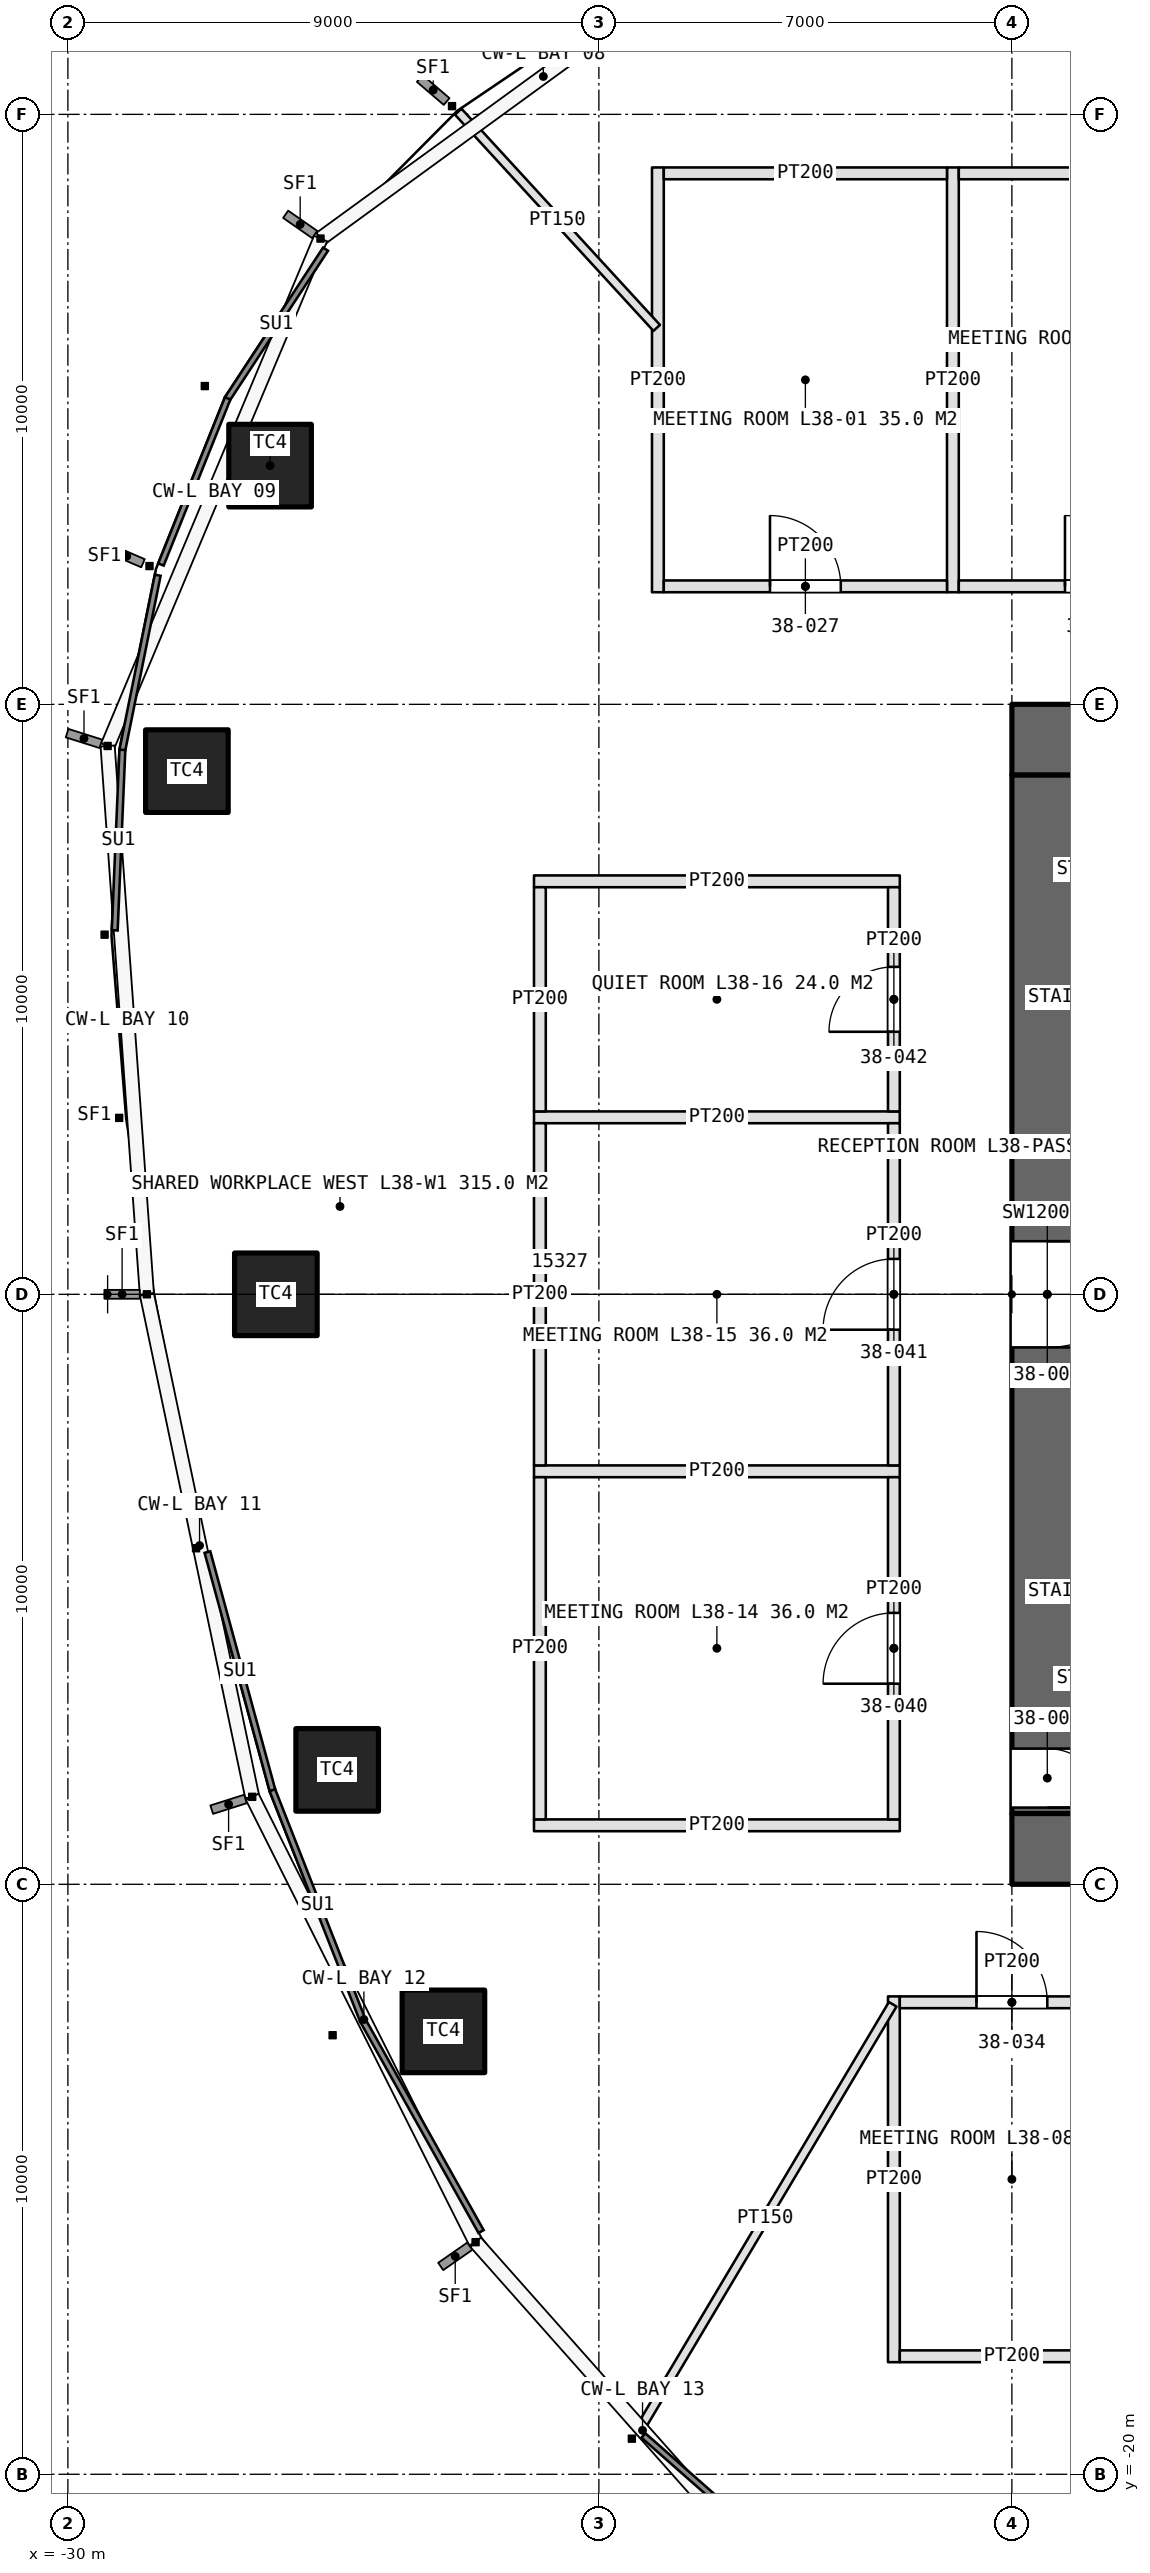
"""IFC4 building model, lengths in metres.
Left out: names, types, materials, properties, quantities, classifications, styles, units other than length and angle.
Written with IfcOpenShell. Run it as: python <this file> out.ifc"""

import sys

from ifc_helpers import new_model, si_unit, direction, frame, frame_2d, origin, origin_2d, place, context, subcontext, project, spatial, rectangle, extrude, element, fill, save


model = new_model("IFC4")
c1 = context("Model", 3, precision=1e-05, world=origin(), true_north=direction((0.0, 1.0)))
c2 = subcontext(c1, "Body", "Model", "MODEL_VIEW")
j1 = project(units=[si_unit("LENGTHUNIT", "METRE"), si_unit("PLANEANGLEUNIT", "RADIAN")], contexts=[c1])
p1 = place(None, origin())
s1 = spatial("IfcSite", under=j1, at=p1, CompositionType="ELEMENT")
p2 = place(p1, origin())
s2 = spatial("IfcBuilding", under=s1, at=p2, CompositionType="ELEMENT")
p3 = place(p2, frame((0.0, 0.0, 176.4)))
s3 = spatial("IfcBuildingStorey", under=s2, at=p3, CompositionType="ELEMENT", Elevation=176.4)
p4 = place(p3, frame((-14.0, -9.4, 0.0), z_axis=(0.0, 0.0, 1.0), x_axis=(1.0, 0.0, 0.0)))
e1 = element("IfcWall", 1, at=p4, inside=s3, PredefinedType="SHEAR", context=c2, shape_type="SweptSolid", body=[
    extrude(rectangle(XDim=28.0, YDim=1.2, at=frame_2d((14.0, 0.0))), origin(), (0.0, 0.0, 1.0), 4.2),
])
p5 = place(p4, frame((13.1, 0.0, 0.0)))
e2 = element("IfcOpeningElement", 2, at=p5, cuts=e1, PredefinedType="OPENING", context=c2, shape_type="SweptSolid", body=[
    extrude(rectangle(XDim=1.8, YDim=2.4, at=frame_2d((0.9, 1.2))), frame((0.0, 0.61, 0.0), z_axis=(0.0, -1.0, 0.0), x_axis=(1.0, 0.0, 0.0)), (0.0, 0.0, 1.0), 1.22),
])
p6 = place(p4, frame((22.9, 0.0, 0.0)))
e3 = element("IfcOpeningElement", 3, at=p6, cuts=e1, PredefinedType="OPENING", context=c2, shape_type="SweptSolid", body=[
    extrude(rectangle(XDim=2.2, YDim=2.7, at=frame_2d((1.1, 1.35))), frame((0.0, 0.61, 0.0), z_axis=(0.0, -1.0, 0.0), x_axis=(1.0, 0.0, 0.0)), (0.0, 0.0, 1.0), 1.22),
])
p7 = place(p3, frame((14.0, 9.4, 0.0), z_axis=(0.0, 0.0, 1.0), x_axis=(-1.0, 0.0, 0.0)))
e4 = element("IfcWall", 4, at=p7, inside=s3, PredefinedType="SHEAR", context=c2, shape_type="SweptSolid", body=[
    extrude(rectangle(XDim=28.0, YDim=1.2, at=frame_2d((14.0, 0.0))), origin(), (0.0, 0.0, 1.0), 4.2),
])
p8 = place(p7, frame((24.0, 0.0, 0.0)))
e5 = element("IfcOpeningElement", 5, at=p8, cuts=e4, PredefinedType="OPENING", context=c2, shape_type="SweptSolid", body=[
    extrude(rectangle(XDim=1.0, YDim=2.4, at=frame_2d((0.5, 1.2))), frame((0.0, 0.61, 0.0), z_axis=(0.0, -1.0, 0.0), x_axis=(1.0, 0.0, 0.0)), (0.0, 0.0, 1.0), 1.22),
])
p9 = place(p7, frame((13.1, 0.0, 0.0)))
e6 = element("IfcOpeningElement", 6, at=p9, cuts=e4, PredefinedType="OPENING", context=c2, shape_type="SweptSolid", body=[
    extrude(rectangle(XDim=1.8, YDim=2.4, at=frame_2d((0.9, 1.2))), frame((0.0, 0.61, 0.0), z_axis=(0.0, -1.0, 0.0), x_axis=(1.0, 0.0, 0.0)), (0.0, 0.0, 1.0), 1.22),
])
p10 = place(p3, frame((-13.4, 8.8, 0.0), z_axis=(0.0, 0.0, 1.0), x_axis=(0.0, -1.0, 0.0)))
e7 = element("IfcWall", 7, at=p10, inside=s3, PredefinedType="SHEAR", context=c2, shape_type="SweptSolid", body=[
    extrude(rectangle(XDim=17.6, YDim=1.2, at=frame_2d((8.8, 0.0))), origin(), (0.0, 0.0, 1.0), 4.2),
])
p11 = place(p10, frame((7.9, 0.0, 0.0)))
e8 = element("IfcOpeningElement", 8, at=p11, cuts=e7, PredefinedType="OPENING", context=c2, shape_type="SweptSolid", body=[
    extrude(rectangle(XDim=1.8, YDim=2.4, at=frame_2d((0.9, 1.2))), frame((0.0, 0.61, 0.0), z_axis=(0.0, -1.0, 0.0), x_axis=(1.0, 0.0, 0.0)), (0.0, 0.0, 1.0), 1.22),
])
p12 = place(p10, frame((16.5, 0.0, 0.0)))
e9 = element("IfcOpeningElement", 9, at=p12, cuts=e7, PredefinedType="OPENING", context=c2, shape_type="SweptSolid", body=[
    extrude(rectangle(XDim=1.0, YDim=2.4, at=frame_2d((0.5, 1.2))), frame((0.0, 0.61, 0.0), z_axis=(0.0, -1.0, 0.0), x_axis=(1.0, 0.0, 0.0)), (0.0, 0.0, 1.0), 1.22),
])
for number, where, z_axis, x_axis in (
    (10, (-26.573, 14.046, 0.0), (0.0, 0.0, 1.0), (1.0, 0.0, 0.0)),
    (11, (-27.983, 8.868, 0.0), (0.0, 0.0, 1.0), (1.0, 0.0, 0.0)),
    (12, (-26.475, 0.0, 0.0), (0.0, 0.0, 1.0), (1.0, 0.0, 0.0)),
    (13, (-25.436, -8.061, 0.0), (0.0, 0.0, 1.0), (1.0, 0.0, 0.0)),
    (14, (-23.635, -12.493, 0.0), (0.0, 0.0, 1.0), (1.0, 0.0, 0.0)),
):
    element("IfcColumn", number, at=place(p3, frame(where, z_axis=z_axis, x_axis=x_axis)), inside=s3, PredefinedType="COLUMN", context=c2, shape_type="SweptSolid", body=[
        extrude(rectangle(XDim=1.4, YDim=1.4, at=origin_2d()), origin(), (0.0, 0.0, 1.0), 4.2),
    ])
for number, where, z_axis, x_axis in (
    (15, (-20.0, 11.9, 0.0), (0.0, 0.0, 1.0), (0.0, 1.0, 0.0)),
    (16, (-15.0, 11.9, 0.0), (0.0, 0.0, 1.0), (0.0, 1.0, 0.0)),
):
    element("IfcWall", number, at=place(p3, frame(where, z_axis=z_axis, x_axis=x_axis)), inside=s3, PredefinedType="PARTITIONING", context=c2, shape_type="SweptSolid", body=[
        extrude(rectangle(XDim=7.2, YDim=0.2, at=frame_2d((3.6, 0.0))), origin(), (0.0, 0.0, 1.0), 3.0),
    ])
p13 = place(p3, frame((-19.9, 12.0, 0.0), z_axis=(0.0, 0.0, 1.0), x_axis=(1.0, 0.0, 0.0)))
e17 = element("IfcWall", 17, at=p13, inside=s3, PredefinedType="PARTITIONING", context=c2, shape_type="SweptSolid", body=[
    extrude(rectangle(XDim=4.8, YDim=0.2, at=frame_2d((2.4, 0.0))), origin(), (0.0, 0.0, 1.0), 3.0),
])
p14 = place(p13, frame((1.8, 0.0, 0.0)))
e18 = element("IfcOpeningElement", 18, at=p14, cuts=e17, PredefinedType="OPENING", context=c2, shape_type="SweptSolid", body=[
    extrude(rectangle(XDim=1.2, YDim=2.4, at=frame_2d((0.6, 1.2))), frame((0.0, 0.11, 0.0), z_axis=(0.0, -1.0, 0.0), x_axis=(1.0, 0.0, 0.0)), (0.0, 0.0, 1.0), 0.22),
])
p15 = place(p3, frame((-19.9, 19.0, 0.0), z_axis=(0.0, 0.0, 1.0), x_axis=(1.0, 0.0, 0.0)))
e19 = element("IfcWall", 19, at=p15, inside=s3, PredefinedType="PARTITIONING", context=c2, shape_type="SweptSolid", body=[
    extrude(rectangle(XDim=4.8, YDim=0.2, at=frame_2d((2.4, 0.0))), origin(), (0.0, 0.0, 1.0), 3.0),
])
p16 = place(p3, frame((-14.9, 12.0, 0.0), z_axis=(0.0, 0.0, 1.0), x_axis=(1.0, 0.0, 0.0)))
e20 = element("IfcWall", 20, at=p16, inside=s3, PredefinedType="PARTITIONING", context=c2, shape_type="SweptSolid", body=[
    extrude(rectangle(XDim=4.8, YDim=0.2, at=frame_2d((2.4, 0.0))), origin(), (0.0, 0.0, 1.0), 3.0),
])
p17 = place(p16, frame((1.8, 0.0, 0.0)))
e21 = element("IfcOpeningElement", 21, at=p17, cuts=e20, PredefinedType="OPENING", context=c2, shape_type="SweptSolid", body=[
    extrude(rectangle(XDim=1.2, YDim=2.4, at=frame_2d((0.6, 1.2))), frame((0.0, 0.11, 0.0), z_axis=(0.0, -1.0, 0.0), x_axis=(1.0, 0.0, 0.0)), (0.0, 0.0, 1.0), 0.22),
])
p18 = place(p3, frame((-14.9, 19.0, 0.0), z_axis=(0.0, 0.0, 1.0), x_axis=(1.0, 0.0, 0.0)))
e22 = element("IfcWall", 22, at=p18, inside=s3, PredefinedType="PARTITIONING", context=c2, shape_type="SweptSolid", body=[
    extrude(rectangle(XDim=4.8, YDim=0.2, at=frame_2d((2.4, 0.0))), origin(), (0.0, 0.0, 1.0), 3.0),
])
p19 = place(p3, frame((-16.0, -11.9, 0.0), z_axis=(0.0, 0.0, 1.0), x_axis=(0.0, -1.0, 0.0)))
e23 = element("IfcWall", 23, at=p19, inside=s3, PredefinedType="PARTITIONING", context=c2, shape_type="SweptSolid", body=[
    extrude(rectangle(XDim=6.2, YDim=0.2, at=frame_2d((3.1, 0.0))), origin(), (0.0, 0.0, 1.0), 3.0),
])
p20 = place(p3, frame((-15.9, -12.0, 0.0), z_axis=(0.0, 0.0, 1.0), x_axis=(1.0, 0.0, 0.0)))
e24 = element("IfcWall", 24, at=p20, inside=s3, PredefinedType="PARTITIONING", context=c2, shape_type="SweptSolid", body=[
    extrude(rectangle(XDim=3.8, YDim=0.2, at=frame_2d((1.9, 0.0))), origin(), (0.0, 0.0, 1.0), 3.0),
])
p21 = place(p20, frame((1.3, 0.0, 0.0)))
e25 = element("IfcOpeningElement", 25, at=p21, cuts=e24, PredefinedType="OPENING", context=c2, shape_type="SweptSolid", body=[
    extrude(rectangle(XDim=1.2, YDim=2.4, at=frame_2d((0.6, 1.2))), frame((0.0, 0.11, 0.0), z_axis=(0.0, -1.0, 0.0), x_axis=(1.0, 0.0, 0.0)), (0.0, 0.0, 1.0), 0.22),
])
p22 = place(p3, frame((-15.9, -18.0, 0.0), z_axis=(0.0, 0.0, 1.0), x_axis=(1.0, 0.0, 0.0)))
e26 = element("IfcWall", 26, at=p22, inside=s3, PredefinedType="PARTITIONING", context=c2, shape_type="SweptSolid", body=[
    extrude(rectangle(XDim=3.8, YDim=0.2, at=frame_2d((1.9, 0.0))), origin(), (0.0, 0.0, 1.0), 3.0),
])
for number, where, z_axis, x_axis in (
    (27, (-15.9, -9.0, 0.0), (0.0, 0.0, 1.0), (-1.0, 0.0, 0.0)),
    (28, (-15.9, -3.0, 0.0), (0.0, 0.0, 1.0), (-1.0, 0.0, 0.0)),
    (29, (-15.9, 3.0, 0.0), (0.0, 0.0, 1.0), (-1.0, 0.0, 0.0)),
    (30, (-15.9, 7.0, 0.0), (0.0, 0.0, 1.0), (-1.0, 0.0, 0.0)),
):
    element("IfcWall", number, at=place(p3, frame(where, z_axis=z_axis, x_axis=x_axis)), inside=s3, PredefinedType="PARTITIONING", context=c2, shape_type="SweptSolid", body=[
        extrude(rectangle(XDim=6.2, YDim=0.2, at=frame_2d((3.1, 0.0))), origin(), (0.0, 0.0, 1.0), 3.0),
    ])
p23 = place(p3, frame((-16.0, -8.9, 0.0), z_axis=(0.0, 0.0, 1.0), x_axis=(0.0, 1.0, 0.0)))
e31 = element("IfcWall", 31, at=p23, inside=s3, PredefinedType="PARTITIONING", context=c2, shape_type="SweptSolid", body=[
    extrude(rectangle(XDim=5.8, YDim=0.2, at=frame_2d((2.9, 0.0))), origin(), (0.0, 0.0, 1.0), 3.0),
])
p24 = place(p23, frame((2.3, 0.0, 0.0)))
e32 = element("IfcOpeningElement", 32, at=p24, cuts=e31, PredefinedType="OPENING", context=c2, shape_type="SweptSolid", body=[
    extrude(rectangle(XDim=1.2, YDim=2.4, at=frame_2d((0.6, 1.2))), frame((0.0, 0.11, 0.0), z_axis=(0.0, -1.0, 0.0), x_axis=(1.0, 0.0, 0.0)), (0.0, 0.0, 1.0), 0.22),
])
p25 = place(p3, frame((-22.0, -8.9, 0.0), z_axis=(0.0, 0.0, 1.0), x_axis=(0.0, 1.0, 0.0)))
e33 = element("IfcWall", 33, at=p25, inside=s3, PredefinedType="PARTITIONING", context=c2, shape_type="SweptSolid", body=[
    extrude(rectangle(XDim=5.8, YDim=0.2, at=frame_2d((2.9, 0.0))), origin(), (0.0, 0.0, 1.0), 3.0),
])
p26 = place(p3, frame((-16.0, -2.9, 0.0), z_axis=(0.0, 0.0, 1.0), x_axis=(0.0, 1.0, 0.0)))
e34 = element("IfcWall", 34, at=p26, inside=s3, PredefinedType="PARTITIONING", context=c2, shape_type="SweptSolid", body=[
    extrude(rectangle(XDim=5.8, YDim=0.2, at=frame_2d((2.9, 0.0))), origin(), (0.0, 0.0, 1.0), 3.0),
])
p27 = place(p26, frame((2.3, 0.0, 0.0)))
e35 = element("IfcOpeningElement", 35, at=p27, cuts=e34, PredefinedType="OPENING", context=c2, shape_type="SweptSolid", body=[
    extrude(rectangle(XDim=1.2, YDim=2.4, at=frame_2d((0.6, 1.2))), frame((0.0, 0.11, 0.0), z_axis=(0.0, -1.0, 0.0), x_axis=(1.0, 0.0, 0.0)), (0.0, 0.0, 1.0), 0.22),
])
p28 = place(p3, frame((-22.0, -2.9, 0.0), z_axis=(0.0, 0.0, 1.0), x_axis=(0.0, 1.0, 0.0)))
e36 = element("IfcWall", 36, at=p28, inside=s3, PredefinedType="PARTITIONING", context=c2, shape_type="SweptSolid", body=[
    extrude(rectangle(XDim=5.8, YDim=0.2, at=frame_2d((2.9, 0.0))), origin(), (0.0, 0.0, 1.0), 3.0),
])
p29 = place(p3, frame((-16.0, 3.1, 0.0), z_axis=(0.0, 0.0, 1.0), x_axis=(0.0, 1.0, 0.0)))
e37 = element("IfcWall", 37, at=p29, inside=s3, PredefinedType="PARTITIONING", context=c2, shape_type="SweptSolid", body=[
    extrude(rectangle(XDim=3.8, YDim=0.2, at=frame_2d((1.9, 0.0))), origin(), (0.0, 0.0, 1.0), 3.0),
])
p30 = place(p29, frame((1.35, 0.0, 0.0)))
e38 = element("IfcOpeningElement", 38, at=p30, cuts=e37, PredefinedType="OPENING", context=c2, shape_type="SweptSolid", body=[
    extrude(rectangle(XDim=1.1, YDim=2.3, at=frame_2d((0.55, 1.15))), frame((0.0, 0.11, 0.0), z_axis=(0.0, -1.0, 0.0), x_axis=(1.0, 0.0, 0.0)), (0.0, 0.0, 1.0), 0.22),
])
p31 = place(p3, frame((-22.0, 3.1, 0.0), z_axis=(0.0, 0.0, 1.0), x_axis=(0.0, 1.0, 0.0)))
e39 = element("IfcWall", 39, at=p31, inside=s3, PredefinedType="PARTITIONING", context=c2, shape_type="SweptSolid", body=[
    extrude(rectangle(XDim=3.8, YDim=0.2, at=frame_2d((1.9, 0.0))), origin(), (0.0, 0.0, 1.0), 3.0),
])
p32 = place(p3, frame((-16.02, -12.034, 0.0), z_axis=(0.0, 0.0, 1.0), x_axis=(-0.511518902153, -0.859272024879, 0.0)))
e40 = element("IfcWall", 40, at=p32, inside=s3, PredefinedType="PARTITIONING", context=c2, shape_type="SweptSolid", body=[
    extrude(rectangle(XDim=8.451, YDim=0.15, at=frame_2d((4.226, 0.0))), origin(), (0.0, 0.0, 1.0), 3.0),
])
p33 = place(p3, frame((-20.02, 16.38, 0.0), z_axis=(0.0, 0.0, 1.0), x_axis=(-0.676159982548, 0.736754828963, 0.0)))
e41 = element("IfcWall", 41, at=p33, inside=s3, PredefinedType="PARTITIONING", context=c2, shape_type="SweptSolid", body=[
    extrude(rectangle(XDim=4.976, YDim=0.15, at=frame_2d((2.488, 0.0))), origin(), (0.0, 0.0, 1.0), 3.0),
])
p34 = place(p11, origin())
e42 = element("IfcDoor", 42, at=p34, inside=s3, OperationType="DOUBLE_DOOR_SINGLE_SWING", PredefinedType="DOOR", context=c2, shape_type="SweptSolid", body=[
    extrude(rectangle(XDim=1.8, YDim=2.4, at=frame_2d((0.9, 1.2))), frame((0.0, 0.025, 0.0), z_axis=(0.0, -1.0, 0.0), x_axis=(1.0, 0.0, 0.0)), (0.0, 0.0, 1.0), 0.05),
])
fill(e8, e42)
p35 = place(p12, origin())
e43 = element("IfcDoor", 43, at=p35, inside=s3, OperationType="SINGLE_SWING_RIGHT", PredefinedType="DOOR", context=c2, shape_type="SweptSolid", body=[
    extrude(rectangle(XDim=1.0, YDim=2.4, at=frame_2d((0.5, 1.2))), frame((0.0, 0.025, 0.0), z_axis=(0.0, -1.0, 0.0), x_axis=(1.0, 0.0, 0.0)), (0.0, 0.0, 1.0), 0.05),
])
fill(e9, e43)
p36 = place(p14, origin())
e44 = element("IfcDoor", 44, at=p36, inside=s3, OperationType="SINGLE_SWING_LEFT", PredefinedType="DOOR", context=c2, shape_type="SweptSolid", body=[
    extrude(rectangle(XDim=1.2, YDim=2.4, at=frame_2d((0.6, 1.2))), frame((0.0, 0.025, 0.0), z_axis=(0.0, -1.0, 0.0), x_axis=(1.0, 0.0, 0.0)), (0.0, 0.0, 1.0), 0.05),
])
fill(e18, e44)
p37 = place(p17, origin())
e45 = element("IfcDoor", 45, at=p37, inside=s3, OperationType="SINGLE_SWING_LEFT", PredefinedType="DOOR", context=c2, shape_type="SweptSolid", body=[
    extrude(rectangle(XDim=1.2, YDim=2.4, at=frame_2d((0.6, 1.2))), frame((0.0, 0.025, 0.0), z_axis=(0.0, -1.0, 0.0), x_axis=(1.0, 0.0, 0.0)), (0.0, 0.0, 1.0), 0.05),
])
fill(e21, e45)
p38 = place(p21, origin())
e46 = element("IfcDoor", 46, at=p38, inside=s3, OperationType="SINGLE_SWING_LEFT", PredefinedType="DOOR", context=c2, shape_type="SweptSolid", body=[
    extrude(rectangle(XDim=1.2, YDim=2.4, at=frame_2d((0.6, 1.2))), frame((0.0, 0.025, 0.0), z_axis=(0.0, -1.0, 0.0), x_axis=(1.0, 0.0, 0.0)), (0.0, 0.0, 1.0), 0.05),
])
fill(e25, e46)
p39 = place(p24, origin())
e47 = element("IfcDoor", 47, at=p39, inside=s3, OperationType="SINGLE_SWING_LEFT", PredefinedType="DOOR", context=c2, shape_type="SweptSolid", body=[
    extrude(rectangle(XDim=1.2, YDim=2.4, at=frame_2d((0.6, 1.2))), frame((0.0, 0.025, 0.0), z_axis=(0.0, -1.0, 0.0), x_axis=(1.0, 0.0, 0.0)), (0.0, 0.0, 1.0), 0.05),
])
fill(e32, e47)
p40 = place(p27, origin())
e48 = element("IfcDoor", 48, at=p40, inside=s3, OperationType="SINGLE_SWING_LEFT", PredefinedType="DOOR", context=c2, shape_type="SweptSolid", body=[
    extrude(rectangle(XDim=1.2, YDim=2.4, at=frame_2d((0.6, 1.2))), frame((0.0, 0.025, 0.0), z_axis=(0.0, -1.0, 0.0), x_axis=(1.0, 0.0, 0.0)), (0.0, 0.0, 1.0), 0.05),
])
fill(e35, e48)
p41 = place(p30, origin())
e49 = element("IfcDoor", 49, at=p41, inside=s3, OperationType="SINGLE_SWING_LEFT", PredefinedType="DOOR", context=c2, shape_type="SweptSolid", body=[
    extrude(rectangle(XDim=1.1, YDim=2.3, at=frame_2d((0.55, 1.15))), frame((0.0, 0.025, 0.0), z_axis=(0.0, -1.0, 0.0), x_axis=(1.0, 0.0, 0.0)), (0.0, 0.0, 1.0), 0.05),
])
fill(e38, e49)
save(model, sys.argv[1])
